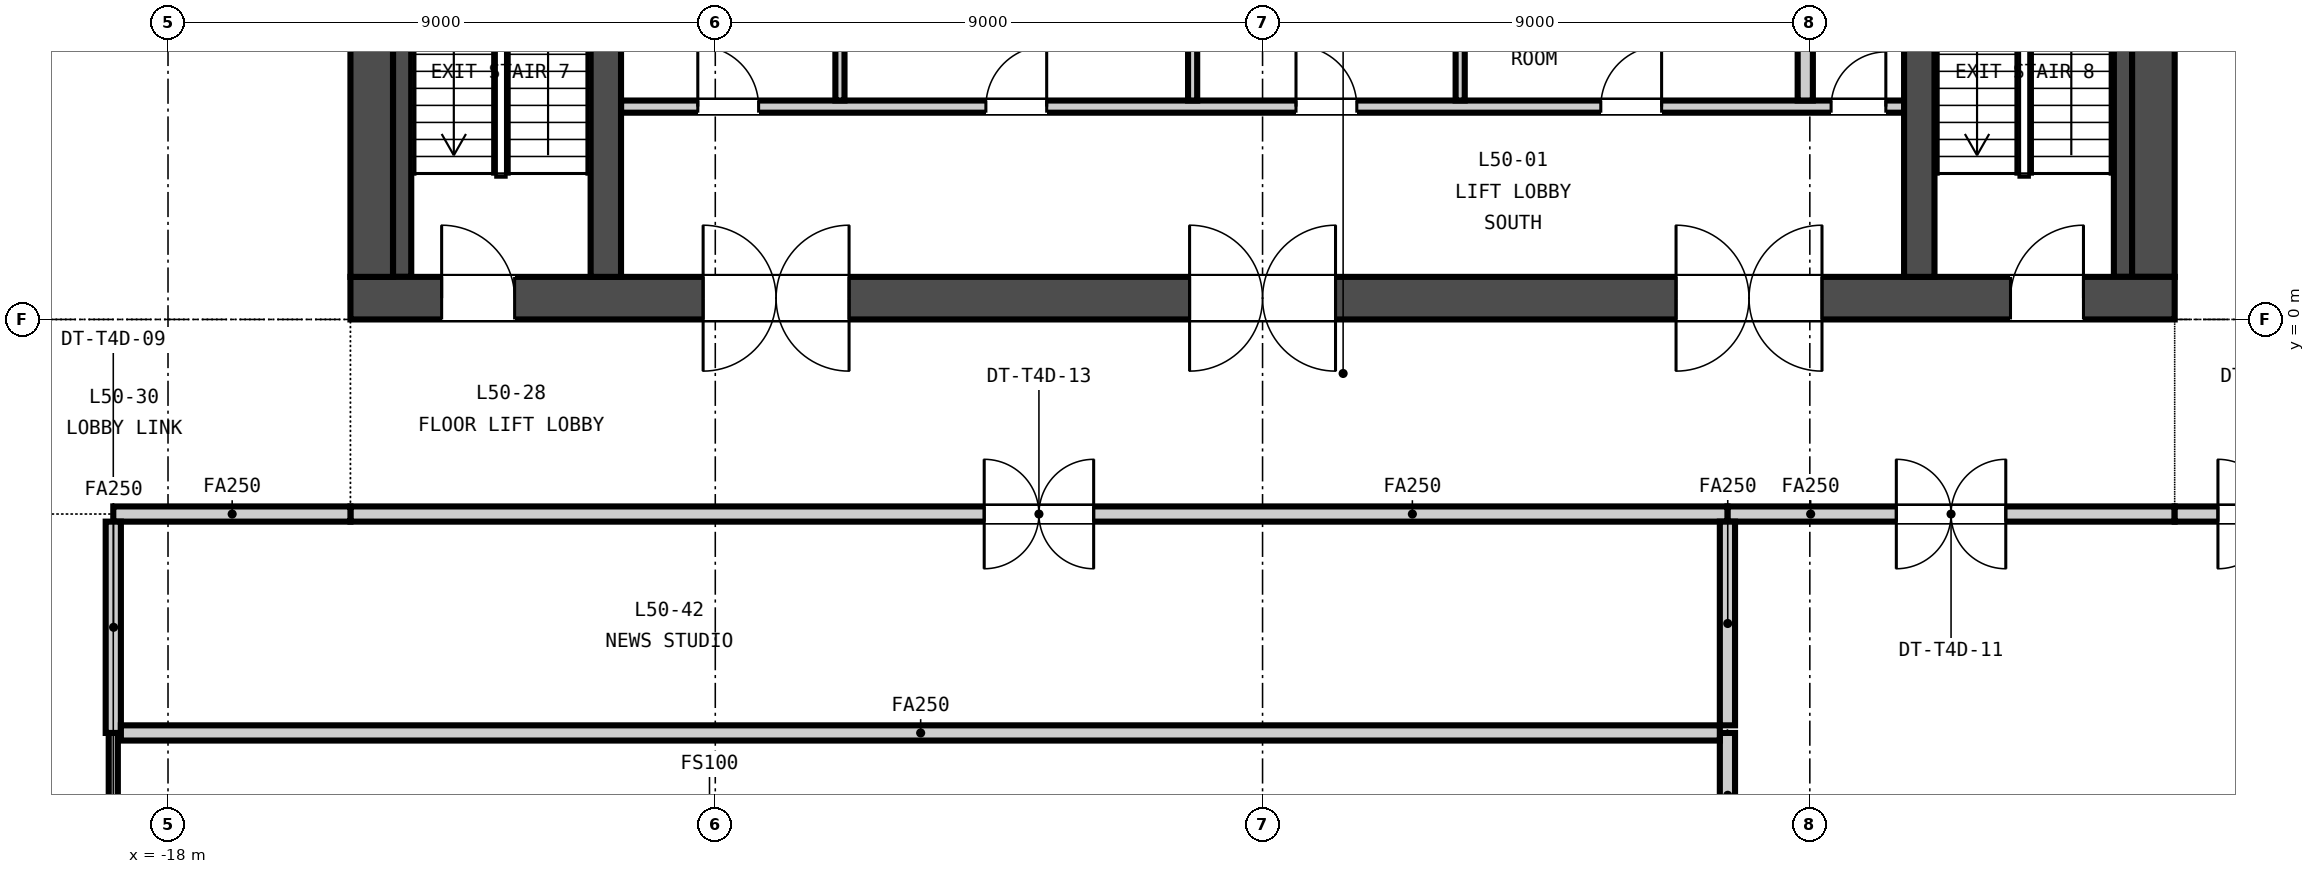
"""IFC4 building model, lengths in metres.
Left out: names, types, materials, properties, quantities, classifications, styles, units other than length and angle.
Written with IfcOpenShell. Run it as: python <this file> out.ifc"""

import sys

from ifc_helpers import new_model, si_unit, direction, frame, frame_2d, origin, place, context, subcontext, project, spatial, rectangle, extrude, element, fill, save


model = new_model("IFC4")
c1 = context("Model", 3, precision=1e-05, world=origin(), true_north=direction((0.0, 1.0)))
c2 = subcontext(c1, "Body", "Model", "MODEL_VIEW")
j1 = project(units=[si_unit("LENGTHUNIT", "METRE"), si_unit("PLANEANGLEUNIT", "RADIAN")], contexts=[c1])
p1 = place(None, origin())
s1 = spatial("IfcSite", under=j1, at=p1, CompositionType="ELEMENT")
p2 = place(p1, origin())
s2 = spatial("IfcBuilding", under=s1, at=p2, CompositionType="ELEMENT")
p3 = place(p2, frame((0.0, 0.0, 200.0)))
s3 = spatial("IfcBuildingStorey", under=s2, at=p3, CompositionType="ELEMENT", Elevation=200.0)
p4 = place(p3, frame((-15.0, 0.35, -0.15), z_axis=(0.0, 0.0, 1.0), x_axis=(1.0, 0.0, 0.0)))
e1 = element("IfcWall", 1, at=p4, inside=s3, PredefinedType="SOLIDWALL", context=c2, shape_type="SweptSolid", body=[
    extrude(rectangle(XDim=30.0, YDim=0.7, at=frame_2d((15.0, 0.0))), origin(), (0.0, 0.0, 1.0), 3.65),
])
p5 = place(p4, frame((5.8, 0.0, 0.15)))
e2 = element("IfcOpeningElement", 2, at=p5, cuts=e1, PredefinedType="OPENING", context=c2, shape_type="SweptSolid", body=[
    extrude(rectangle(XDim=2.4, YDim=2.4, at=frame_2d((1.2, 1.2))), frame((0.0, 0.36, 0.0), z_axis=(0.0, -1.0, 0.0), x_axis=(1.0, 0.0, 0.0)), (0.0, 0.0, 1.0), 0.72),
])
p6 = place(p4, frame((13.8, 0.0, 0.15)))
e3 = element("IfcOpeningElement", 3, at=p6, cuts=e1, PredefinedType="OPENING", context=c2, shape_type="SweptSolid", body=[
    extrude(rectangle(XDim=2.4, YDim=2.4, at=frame_2d((1.2, 1.2))), frame((0.0, 0.36, 0.0), z_axis=(0.0, -1.0, 0.0), x_axis=(1.0, 0.0, 0.0)), (0.0, 0.0, 1.0), 0.72),
])
p7 = place(p4, frame((21.8, 0.0, 0.15)))
e4 = element("IfcOpeningElement", 4, at=p7, cuts=e1, PredefinedType="OPENING", context=c2, shape_type="SweptSolid", body=[
    extrude(rectangle(XDim=2.4, YDim=2.4, at=frame_2d((1.2, 1.2))), frame((0.0, 0.36, 0.0), z_axis=(0.0, -1.0, 0.0), x_axis=(1.0, 0.0, 0.0)), (0.0, 0.0, 1.0), 0.72),
])
p8 = place(p4, frame((1.5, 0.0, 0.15)))
e5 = element("IfcOpeningElement", 5, at=p8, cuts=e1, PredefinedType="OPENING", context=c2, shape_type="SweptSolid", body=[
    extrude(rectangle(XDim=1.2, YDim=2.1, at=frame_2d((0.6, 1.05))), frame((0.0, 0.36, 0.0), z_axis=(0.0, -1.0, 0.0), x_axis=(1.0, 0.0, 0.0)), (0.0, 0.0, 1.0), 0.72),
])
p9 = place(p4, frame((27.3, 0.0, 0.15)))
e6 = element("IfcOpeningElement", 6, at=p9, cuts=e1, PredefinedType="OPENING", context=c2, shape_type="SweptSolid", body=[
    extrude(rectangle(XDim=1.2, YDim=2.1, at=frame_2d((0.6, 1.05))), frame((0.0, 0.36, 0.0), z_axis=(0.0, -1.0, 0.0), x_axis=(1.0, 0.0, 0.0)), (0.0, 0.0, 1.0), 0.72),
])
for number, where, z_axis, x_axis in (
    (7, (-14.65, 0.7, -0.15), (0.0, 0.0, 1.0), (0.0, 1.0, 0.0)),
    (8, (14.65, 0.7, -0.15), (0.0, 0.0, 1.0), (0.0, 1.0, 0.0)),
):
    element("IfcWall", number, at=place(p3, frame(where, z_axis=z_axis, x_axis=x_axis)), inside=s3, PredefinedType="SOLIDWALL", context=c2, shape_type="SweptSolid", body=[
        extrude(rectangle(XDim=13.6, YDim=0.7, at=frame_2d((6.8, 0.0))), origin(), (0.0, 0.0, 1.0), 3.65),
    ])
for number, where, z_axis, x_axis in (
    (9, (-10.8, 0.7, -0.15), (0.0, 0.0, 1.0), (0.0, 1.0, 0.0)),
    (10, (10.8, 0.7, -0.15), (0.0, 0.0, 1.0), (0.0, 1.0, 0.0)),
):
    element("IfcWall", number, at=place(p3, frame(where, z_axis=z_axis, x_axis=x_axis)), inside=s3, PredefinedType="SOLIDWALL", context=c2, shape_type="SweptSolid", body=[
        extrude(rectangle(XDim=13.6, YDim=0.5, at=frame_2d((6.8, 0.0))), origin(), (0.0, 0.0, 1.0), 3.65),
    ])
p10 = place(p3, frame((-10.55, 3.5, 0.0), z_axis=(0.0, 0.0, 1.0), x_axis=(1.0, 0.0, 0.0)))
e11 = element("IfcWall", 11, at=p10, inside=s3, PredefinedType="PARTITIONING", context=c2, shape_type="SweptSolid", body=[
    extrude(rectangle(XDim=21.1, YDim=0.2, at=frame_2d((10.55, 0.0))), origin(), (0.0, 0.0, 1.0), 3.5),
])
p11 = place(p10, frame((1.262, 0.0, 0.0)))
e12 = element("IfcOpeningElement", 12, at=p11, cuts=e11, PredefinedType="OPENING", context=c2, shape_type="SweptSolid", body=[
    extrude(rectangle(XDim=1.0, YDim=2.1, at=frame_2d((0.5, 1.05))), frame((0.0, 0.11, 0.0), z_axis=(0.0, -1.0, 0.0), x_axis=(1.0, 0.0, 0.0)), (0.0, 0.0, 1.0), 0.22),
])
p12 = place(p10, frame((6.0, 0.0, 0.0)))
e13 = element("IfcOpeningElement", 13, at=p12, cuts=e11, PredefinedType="OPENING", context=c2, shape_type="SweptSolid", body=[
    extrude(rectangle(XDim=1.0, YDim=2.1, at=frame_2d((0.5, 1.05))), frame((0.0, 0.11, 0.0), z_axis=(0.0, -1.0, 0.0), x_axis=(1.0, 0.0, 0.0)), (0.0, 0.0, 1.0), 0.22),
])
p13 = place(p10, frame((11.1, 0.0, 0.0)))
e14 = element("IfcOpeningElement", 14, at=p13, cuts=e11, PredefinedType="OPENING", context=c2, shape_type="SweptSolid", body=[
    extrude(rectangle(XDim=1.0, YDim=2.1, at=frame_2d((0.5, 1.05))), frame((0.0, 0.11, 0.0), z_axis=(0.0, -1.0, 0.0), x_axis=(1.0, 0.0, 0.0)), (0.0, 0.0, 1.0), 0.22),
])
p14 = place(p10, frame((16.113, 0.0, 0.0)))
e15 = element("IfcOpeningElement", 15, at=p14, cuts=e11, PredefinedType="OPENING", context=c2, shape_type="SweptSolid", body=[
    extrude(rectangle(XDim=1.0, YDim=2.1, at=frame_2d((0.5, 1.05))), frame((0.0, 0.11, 0.0), z_axis=(0.0, -1.0, 0.0), x_axis=(1.0, 0.0, 0.0)), (0.0, 0.0, 1.0), 0.22),
])
p15 = place(p10, frame((19.9, 0.0, 0.0)))
e16 = element("IfcOpeningElement", 16, at=p15, cuts=e11, PredefinedType="OPENING", context=c2, shape_type="SweptSolid", body=[
    extrude(rectangle(XDim=0.9, YDim=2.1, at=frame_2d((0.45, 1.05))), frame((0.0, 0.11, 0.0), z_axis=(0.0, -1.0, 0.0), x_axis=(1.0, 0.0, 0.0)), (0.0, 0.0, 1.0), 0.22),
])
for number, where, z_axis, x_axis in (
    (17, (-6.95, 3.6, 0.0), (0.0, 0.0, 1.0), (0.0, 1.0, 0.0)),
    (18, (-1.15, 3.6, 0.0), (0.0, 0.0, 1.0), (0.0, 1.0, 0.0)),
    (19, (3.25, 3.6, 0.0), (0.0, 0.0, 1.0), (0.0, 1.0, 0.0)),
):
    element("IfcWall", number, at=place(p3, frame(where, z_axis=z_axis, x_axis=x_axis)), inside=s3, PredefinedType="PARTITIONING", context=c2, shape_type="SweptSolid", body=[
        extrude(rectangle(XDim=2.3, YDim=0.15, at=frame_2d((1.15, 0.0))), origin(), (0.0, 0.0, 1.0), 3.5),
    ])
p16 = place(p3, frame((8.925, 3.6, 0.0), z_axis=(0.0, 0.0, 1.0), x_axis=(0.0, 1.0, 0.0)))
e20 = element("IfcWall", 20, at=p16, inside=s3, PredefinedType="PARTITIONING", context=c2, shape_type="SweptSolid", body=[
    extrude(rectangle(XDim=2.3, YDim=0.25, at=frame_2d((1.15, 0.0))), origin(), (0.0, 0.0, 1.0), 3.5),
])
for number, where, z_axis, x_axis in (
    (21, (-14.15, 0.7, 0.0), (0.0, 0.0, 1.0), (0.0, 1.0, 0.0)),
    (22, (14.15, 0.7, 0.0), (0.0, 0.0, 1.0), (0.0, 1.0, 0.0)),
):
    element("IfcWall", number, at=place(p3, frame(where, z_axis=z_axis, x_axis=x_axis)), inside=s3, PredefinedType="SOLIDWALL", context=c2, shape_type="SweptSolid", body=[
        extrude(rectangle(XDim=13.6, YDim=0.3, at=frame_2d((6.8, 0.0))), origin(), (0.0, 0.0, 1.0), 3.5),
    ])
p17 = place(p3, frame((15.0, -3.2, 0.0), z_axis=(0.0, 0.0, 1.0), x_axis=(-1.0, 0.0, 0.0)))
e23 = element("IfcWall", 23, at=p17, inside=s3, PredefinedType="PARTITIONING", context=c2, shape_type="SweptSolid", body=[
    extrude(rectangle(XDim=7.355, YDim=0.25, at=frame_2d((3.677, 0.0))), origin(), (0.0, 0.0, 1.0), 2.741),
])
p18 = place(p17, frame((2.778, 0.0, 0.0)))
e24 = element("IfcOpeningElement", 24, at=p18, cuts=e23, PredefinedType="OPENING", context=c2, shape_type="SweptSolid", body=[
    extrude(rectangle(XDim=1.8, YDim=2.1, at=frame_2d((0.9, 1.05))), frame((0.0, 0.135, 0.0), z_axis=(0.0, -1.0, 0.0), x_axis=(1.0, 0.0, 0.0)), (0.0, 0.0, 1.0), 0.27),
])
p19 = place(p3, frame((7.645, -3.2, 0.0), z_axis=(0.0, 0.0, 1.0), x_axis=(-1.0, 0.0, 0.0)))
e25 = element("IfcWall", 25, at=p19, inside=s3, PredefinedType="PARTITIONING", context=c2, shape_type="SweptSolid", body=[
    extrude(rectangle(XDim=22.645, YDim=0.25, at=frame_2d((11.323, 0.0))), origin(), (0.0, 0.0, 1.0), 2.741),
])
p20 = place(p19, frame((10.423, 0.0, 0.0)))
e26 = element("IfcOpeningElement", 26, at=p20, cuts=e25, PredefinedType="OPENING", context=c2, shape_type="SweptSolid", body=[
    extrude(rectangle(XDim=1.8, YDim=2.1, at=frame_2d((0.9, 1.05))), frame((0.0, 0.135, 0.0), z_axis=(0.0, -1.0, 0.0), x_axis=(1.0, 0.0, 0.0)), (0.0, 0.0, 1.0), 0.27),
])
p21 = place(p3, frame((18.223, -3.2, 0.0), z_axis=(0.0, 0.0, 1.0), x_axis=(-1.0, 0.0, 0.0)))
e27 = element("IfcWall", 27, at=p21, inside=s3, PredefinedType="PARTITIONING", context=c2, shape_type="SweptSolid", body=[
    extrude(rectangle(XDim=3.223, YDim=0.25, at=frame_2d((1.611, 0.0))), origin(), (0.0, 0.0, 1.0), 2.741),
])
p22 = place(p21, frame((0.711, 0.0, 0.0)))
e28 = element("IfcOpeningElement", 28, at=p22, cuts=e27, PredefinedType="OPENING", context=c2, shape_type="SweptSolid", body=[
    extrude(rectangle(XDim=1.8, YDim=2.1, at=frame_2d((0.9, 1.05))), frame((0.0, 0.135, 0.0), z_axis=(0.0, -1.0, 0.0), x_axis=(1.0, 0.0, 0.0)), (0.0, 0.0, 1.0), 0.27),
])
p23 = place(p3, frame((-15.0, -3.2, 0.0), z_axis=(0.0, 0.0, 1.0), x_axis=(-1.0, 0.0, 0.0)))
e29 = element("IfcWall", 29, at=p23, inside=s3, PredefinedType="PARTITIONING", context=c2, shape_type="SweptSolid", body=[
    extrude(rectangle(XDim=3.9, YDim=0.25, at=frame_2d((1.95, 0.0))), origin(), (0.0, 0.0, 1.0), 2.741),
])
p24 = place(p3, frame((-18.9, -6.8, 0.0), z_axis=(0.0, 0.0, 1.0), x_axis=(0.0, -1.0, 0.0)))
e30 = element("IfcWall", 30, at=p24, inside=s3, PredefinedType="PARTITIONING", context=c2, shape_type="SweptSolid", body=[
    extrude(rectangle(XDim=8.325, YDim=0.15, at=frame_2d((4.163, 0.0))), origin(), (0.0, 0.0, 1.0), 2.741),
])
p25 = place(p24, frame((3.262, 0.0, 0.0)))
e31 = element("IfcOpeningElement", 31, at=p25, cuts=e30, PredefinedType="OPENING", context=c2, shape_type="SweptSolid", body=[
    extrude(rectangle(XDim=1.8, YDim=2.1, at=frame_2d((0.9, 1.05))), frame((0.0, 0.085, 0.0), z_axis=(0.0, -1.0, 0.0), x_axis=(1.0, 0.0, 0.0)), (0.0, 0.0, 1.0), 0.17),
])
p26 = place(p3, frame((-18.9, -3.325, 0.0), z_axis=(0.0, 0.0, 1.0), x_axis=(0.0, -1.0, 0.0)))
e32 = element("IfcWall", 32, at=p26, inside=s3, PredefinedType="PARTITIONING", context=c2, shape_type="SweptSolid", body=[
    extrude(rectangle(XDim=3.475, YDim=0.25, at=frame_2d((1.738, 0.0))), origin(), (0.0, 0.0, 1.0), 2.741),
])
p27 = place(p3, frame((7.645, -8.85, 0.0), z_axis=(0.0, 0.0, 1.0), x_axis=(0.0, 1.0, 0.0)))
e33 = element("IfcWall", 33, at=p27, inside=s3, PredefinedType="PARTITIONING", context=c2, shape_type="SweptSolid", body=[
    extrude(rectangle(XDim=2.05, YDim=0.25, at=frame_2d((1.025, 0.0))), origin(), (0.0, 0.0, 1.0), 2.741),
])
p28 = place(p3, frame((-18.775, -6.8, 0.0), z_axis=(0.0, 0.0, 1.0), x_axis=(1.0, 0.0, 0.0)))
e34 = element("IfcWall", 34, at=p28, inside=s3, PredefinedType="PARTITIONING", context=c2, shape_type="SweptSolid", body=[
    extrude(rectangle(XDim=26.295, YDim=0.25, at=frame_2d((13.147, 0.0))), origin(), (0.0, 0.0, 1.0), 2.741),
])
p29 = place(p3, frame((7.645, -6.675, 0.0), z_axis=(0.0, 0.0, 1.0), x_axis=(0.0, 1.0, 0.0)))
e35 = element("IfcWall", 35, at=p29, inside=s3, PredefinedType="PARTITIONING", context=c2, shape_type="SweptSolid", body=[
    extrude(rectangle(XDim=3.35, YDim=0.25, at=frame_2d((1.675, 0.0))), origin(), (0.0, 0.0, 1.0), 2.741),
])
p30 = place(p11, origin())
e36 = element("IfcDoor", 36, at=p30, inside=s3, OperationType="SINGLE_SWING_LEFT", PredefinedType="DOOR", context=c2, shape_type="SweptSolid", body=[
    extrude(rectangle(XDim=1.0, YDim=2.1, at=frame_2d((0.5, 1.05))), frame((0.0, 0.025, 0.0), z_axis=(0.0, -1.0, 0.0), x_axis=(1.0, 0.0, 0.0)), (0.0, 0.0, 1.0), 0.05),
])
fill(e12, e36)
p31 = place(p12, origin())
e37 = element("IfcDoor", 37, at=p31, inside=s3, OperationType="SINGLE_SWING_RIGHT", PredefinedType="DOOR", context=c2, shape_type="SweptSolid", body=[
    extrude(rectangle(XDim=1.0, YDim=2.1, at=frame_2d((0.5, 1.05))), frame((0.0, 0.025, 0.0), z_axis=(0.0, -1.0, 0.0), x_axis=(1.0, 0.0, 0.0)), (0.0, 0.0, 1.0), 0.05),
])
fill(e13, e37)
p32 = place(p13, origin())
e38 = element("IfcDoor", 38, at=p32, inside=s3, OperationType="SINGLE_SWING_LEFT", PredefinedType="DOOR", context=c2, shape_type="SweptSolid", body=[
    extrude(rectangle(XDim=1.0, YDim=2.1, at=frame_2d((0.5, 1.05))), frame((0.0, 0.025, 0.0), z_axis=(0.0, -1.0, 0.0), x_axis=(1.0, 0.0, 0.0)), (0.0, 0.0, 1.0), 0.05),
])
fill(e14, e38)
p33 = place(p14, origin())
e39 = element("IfcDoor", 39, at=p33, inside=s3, OperationType="SINGLE_SWING_RIGHT", PredefinedType="DOOR", context=c2, shape_type="SweptSolid", body=[
    extrude(rectangle(XDim=1.0, YDim=2.1, at=frame_2d((0.5, 1.05))), frame((0.0, 0.025, 0.0), z_axis=(0.0, -1.0, 0.0), x_axis=(1.0, 0.0, 0.0)), (0.0, 0.0, 1.0), 0.05),
])
fill(e15, e39)
p34 = place(p15, origin())
e40 = element("IfcDoor", 40, at=p34, inside=s3, OperationType="SINGLE_SWING_RIGHT", PredefinedType="DOOR", context=c2, shape_type="SweptSolid", body=[
    extrude(rectangle(XDim=0.9, YDim=2.1, at=frame_2d((0.45, 1.05))), frame((0.0, 0.025, 0.0), z_axis=(0.0, -1.0, 0.0), x_axis=(1.0, 0.0, 0.0)), (0.0, 0.0, 1.0), 0.05),
])
fill(e16, e40)
p35 = place(p5, origin())
e41 = element("IfcDoor", 41, at=p35, inside=s3, OperationType="DOUBLE_DOOR_DOUBLE_SWING", PredefinedType="DOOR", context=c2, shape_type="SweptSolid", body=[
    extrude(rectangle(XDim=2.4, YDim=2.4, at=frame_2d((1.2, 1.2))), frame((0.0, 0.025, 0.0), z_axis=(0.0, -1.0, 0.0), x_axis=(1.0, 0.0, 0.0)), (0.0, 0.0, 1.0), 0.05),
])
fill(e2, e41)
p36 = place(p6, origin())
e42 = element("IfcDoor", 42, at=p36, inside=s3, OperationType="DOUBLE_DOOR_DOUBLE_SWING", PredefinedType="DOOR", context=c2, shape_type="SweptSolid", body=[
    extrude(rectangle(XDim=2.4, YDim=2.4, at=frame_2d((1.2, 1.2))), frame((0.0, 0.025, 0.0), z_axis=(0.0, -1.0, 0.0), x_axis=(1.0, 0.0, 0.0)), (0.0, 0.0, 1.0), 0.05),
])
fill(e3, e42)
p37 = place(p7, origin())
e43 = element("IfcDoor", 43, at=p37, inside=s3, OperationType="DOUBLE_DOOR_DOUBLE_SWING", PredefinedType="DOOR", context=c2, shape_type="SweptSolid", body=[
    extrude(rectangle(XDim=2.4, YDim=2.4, at=frame_2d((1.2, 1.2))), frame((0.0, 0.025, 0.0), z_axis=(0.0, -1.0, 0.0), x_axis=(1.0, 0.0, 0.0)), (0.0, 0.0, 1.0), 0.05),
])
fill(e4, e43)
p38 = place(p8, origin())
e44 = element("IfcDoor", 44, at=p38, inside=s3, OperationType="SINGLE_SWING_LEFT", PredefinedType="DOOR", context=c2, shape_type="SweptSolid", body=[
    extrude(rectangle(XDim=1.2, YDim=2.1, at=frame_2d((0.6, 1.05))), frame((0.0, 0.025, 0.0), z_axis=(0.0, -1.0, 0.0), x_axis=(1.0, 0.0, 0.0)), (0.0, 0.0, 1.0), 0.05),
])
fill(e5, e44)
p39 = place(p9, origin())
e45 = element("IfcDoor", 45, at=p39, inside=s3, OperationType="SINGLE_SWING_RIGHT", PredefinedType="DOOR", context=c2, shape_type="SweptSolid", body=[
    extrude(rectangle(XDim=1.2, YDim=2.1, at=frame_2d((0.6, 1.05))), frame((0.0, 0.025, 0.0), z_axis=(0.0, -1.0, 0.0), x_axis=(1.0, 0.0, 0.0)), (0.0, 0.0, 1.0), 0.05),
])
fill(e6, e45)
p40 = place(p18, origin())
e46 = element("IfcDoor", 46, at=p40, inside=s3, OperationType="DOUBLE_DOOR_DOUBLE_SWING", PredefinedType="DOOR", context=c2, shape_type="SweptSolid", body=[
    extrude(rectangle(XDim=1.8, YDim=2.1, at=frame_2d((0.9, 1.05))), frame((0.0, 0.025, 0.0), z_axis=(0.0, -1.0, 0.0), x_axis=(1.0, 0.0, 0.0)), (0.0, 0.0, 1.0), 0.05),
])
fill(e24, e46)
p41 = place(p22, origin())
e47 = element("IfcDoor", 47, at=p41, inside=s3, OperationType="DOUBLE_DOOR_DOUBLE_SWING", PredefinedType="DOOR", context=c2, shape_type="SweptSolid", body=[
    extrude(rectangle(XDim=1.8, YDim=2.1, at=frame_2d((0.9, 1.05))), frame((0.0, 0.025, 0.0), z_axis=(0.0, -1.0, 0.0), x_axis=(1.0, 0.0, 0.0)), (0.0, 0.0, 1.0), 0.05),
])
fill(e28, e47)
p42 = place(p20, origin())
e48 = element("IfcDoor", 48, at=p42, inside=s3, OperationType="DOUBLE_DOOR_DOUBLE_SWING", PredefinedType="DOOR", context=c2, shape_type="SweptSolid", body=[
    extrude(rectangle(XDim=1.8, YDim=2.1, at=frame_2d((0.9, 1.05))), frame((0.0, 0.025, 0.0), z_axis=(0.0, -1.0, 0.0), x_axis=(1.0, 0.0, 0.0)), (0.0, 0.0, 1.0), 0.05),
])
fill(e26, e48)
save(model, sys.argv[1])
